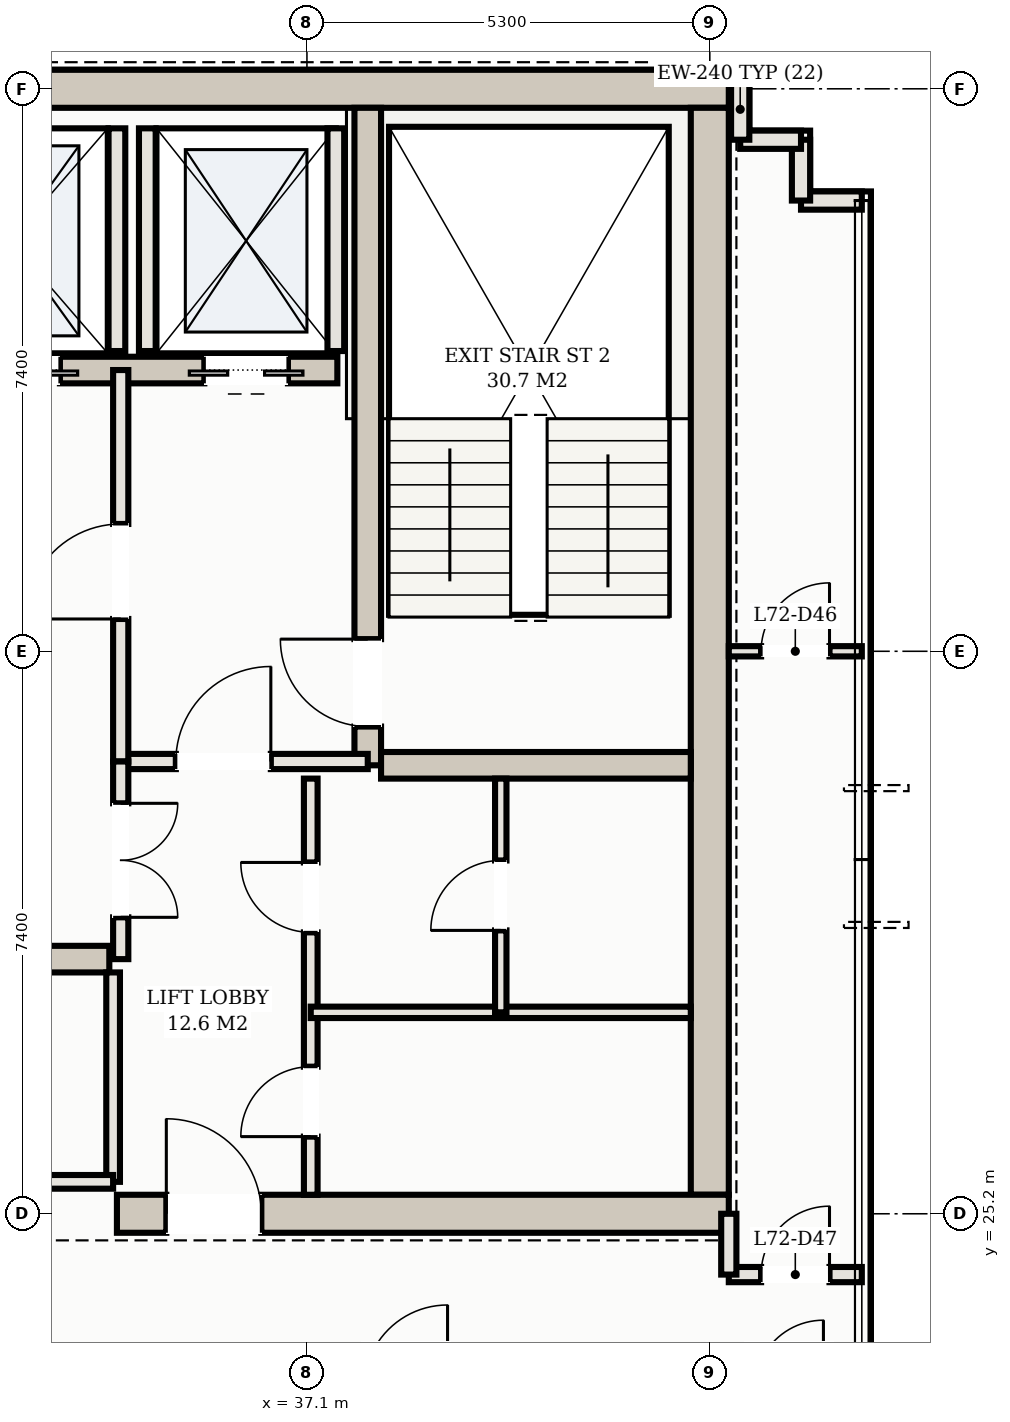
"""IFC4 building model, lengths in metres.
Left out: names, types, materials, properties, quantities, classifications, styles, units other than length and angle.
Written with IfcOpenShell. Run it as: python <this file> out.ifc"""

import sys

from ifc_helpers import new_model, si_unit, direction, frame, frame_2d, origin, place, context, subcontext, project, spatial, rectangle, extrude, element, fill, save


model = new_model("IFC4")
c1 = context("Model", 3, precision=1e-05, world=origin(), true_north=direction((0.0, 1.0)))
c2 = subcontext(c1, "Body", "Model", "MODEL_VIEW")
j1 = project(units=[si_unit("LENGTHUNIT", "METRE"), si_unit("PLANEANGLEUNIT", "RADIAN")], contexts=[c1])
p1 = place(None, origin())
s1 = spatial("IfcSite", under=j1, at=p1, CompositionType="ELEMENT")
p2 = place(p1, origin())
s2 = spatial("IfcBuilding", under=s1, at=p2, CompositionType="ELEMENT")
p3 = place(p2, frame((0.0, 0.0, 259.4)))
s3 = spatial("IfcBuildingStorey", under=s2, at=p3, CompositionType="ELEMENT", Elevation=259.4)
p4 = place(p3, frame((10.35, 40.0, 0.0), z_axis=(0.0, 0.0, 1.0), x_axis=(1.0, 0.0, 0.0)))
e1 = element("IfcWall", 1, at=p4, inside=s3, PredefinedType="SHEAR", context=c2, shape_type="SweptSolid", body=[
    extrude(rectangle(XDim=32.3, YDim=0.5, at=frame_2d((16.15, 0.0))), origin(), (0.0, 0.0, 1.0), 3.11),
])
p5 = place(p3, frame((42.4, 25.45, 0.0), z_axis=(0.0, 0.0, 1.0), x_axis=(0.0, 1.0, 0.0)))
e2 = element("IfcWall", 2, at=p5, inside=s3, PredefinedType="SHEAR", context=c2, shape_type="SweptSolid", body=[
    extrude(rectangle(XDim=14.3, YDim=0.5, at=frame_2d((7.15, 0.0))), origin(), (0.0, 0.0, 1.0), 3.11),
])
p6 = place(p3, frame((34.6, 25.2, 0.0), z_axis=(0.0, 0.0, 1.0), x_axis=(1.0, 0.0, 0.0)))
e3 = element("IfcWall", 3, at=p6, inside=s3, PredefinedType="SHEAR", context=c2, shape_type="SweptSolid", body=[
    extrude(rectangle(XDim=8.05, YDim=0.5, at=frame_2d((4.025, 0.0))), origin(), (0.0, 0.0, 1.0), 3.11),
])
p7 = place(p6, frame((0.65, 0.0, 0.0)))
e4 = element("IfcOpeningElement", 4, at=p7, cuts=e3, PredefinedType="OPENING", context=c2, shape_type="SweptSolid", body=[
    extrude(rectangle(XDim=1.25, YDim=2.2, at=frame_2d((0.625, 1.1))), frame((0.0, 0.26, 0.0), z_axis=(0.0, -1.0, 0.0), x_axis=(1.0, 0.0, 0.0)), (0.0, 0.0, 1.0), 0.52),
])
p8 = place(p3, frame((37.9, 31.1, 0.0), z_axis=(0.0, 0.0, 1.0), x_axis=(0.0, 1.0, 0.0)))
e5 = element("IfcWall", 5, at=p8, inside=s3, PredefinedType="SHEAR", context=c2, shape_type="SweptSolid", body=[
    extrude(rectangle(XDim=8.65, YDim=0.35, at=frame_2d((4.325, 0.0))), origin(), (0.0, 0.0, 1.0), 3.11),
])
p9 = place(p8, frame((0.51, 0.0, 0.0)))
e6 = element("IfcOpeningElement", 6, at=p9, cuts=e5, PredefinedType="OPENING", context=c2, shape_type="SweptSolid", body=[
    extrude(rectangle(XDim=1.15, YDim=2.2, at=frame_2d((0.575, 1.1))), frame((0.0, 0.185, 0.0), z_axis=(0.0, -1.0, 0.0), x_axis=(1.0, 0.0, 0.0)), (0.0, 0.0, 1.0), 0.37),
])
p10 = place(p3, frame((38.075, 31.1, 0.0), z_axis=(0.0, 0.0, 1.0), x_axis=(1.0, 0.0, 0.0)))
e7 = element("IfcWall", 7, at=p10, inside=s3, PredefinedType="SHEAR", context=c2, shape_type="SweptSolid", body=[
    extrude(rectangle(XDim=4.075, YDim=0.35, at=frame_2d((2.038, 0.0))), origin(), (0.0, 0.0, 1.0), 3.11),
])
p11 = place(p3, frame((15.5, 36.3, 0.0), z_axis=(0.0, 0.0, 1.0), x_axis=(1.0, 0.0, 0.0)))
e8 = element("IfcWall", 8, at=p11, inside=s3, PredefinedType="SHEAR", context=c2, shape_type="SweptSolid", body=[
    extrude(rectangle(XDim=22.0, YDim=0.35, at=frame_2d((11.0, 0.0))), origin(), (0.0, 0.0, 1.0), 3.11),
])
p12 = place(p11, frame((0.65, 0.0, 0.0)))
e9 = element("IfcOpeningElement", 9, at=p12, cuts=e8, PredefinedType="OPENING", context=c2, shape_type="SweptSolid", body=[
    extrude(rectangle(XDim=1.1, YDim=2.15, at=frame_2d((0.55, 1.075))), frame((0.0, 0.185, 0.0), z_axis=(0.0, -1.0, 0.0), x_axis=(1.0, 0.0, 0.0)), (0.0, 0.0, 1.0), 0.37),
])
p13 = place(p11, frame((20.25, 0.0, 0.0)))
e10 = element("IfcOpeningElement", 10, at=p13, cuts=e8, PredefinedType="OPENING", context=c2, shape_type="SweptSolid", body=[
    extrude(rectangle(XDim=1.1, YDim=2.15, at=frame_2d((0.55, 1.075))), frame((0.0, 0.185, 0.0), z_axis=(0.0, -1.0, 0.0), x_axis=(1.0, 0.0, 0.0)), (0.0, 0.0, 1.0), 0.37),
])
p14 = place(p11, frame((17.05, 0.0, 0.0)))
e11 = element("IfcOpeningElement", 11, at=p14, cuts=e8, PredefinedType="OPENING", context=c2, shape_type="SweptSolid", body=[
    extrude(rectangle(XDim=1.3, YDim=2.2, at=frame_2d((0.65, 1.1))), frame((0.0, 0.185, 0.0), z_axis=(0.0, -1.0, 0.0), x_axis=(1.0, 0.0, 0.0)), (0.0, 0.0, 1.0), 0.37),
])
p15 = place(p11, frame((3.95, 0.0, 0.0)))
e12 = element("IfcOpeningElement", 12, at=p15, cuts=e8, PredefinedType="OPENING", context=c2, shape_type="SweptSolid", body=[
    extrude(rectangle(XDim=1.1, YDim=2.15, at=frame_2d((0.55, 1.075))), frame((0.0, 0.185, 0.0), z_axis=(0.0, -1.0, 0.0), x_axis=(1.0, 0.0, 0.0)), (0.0, 0.0, 1.0), 0.37),
])
p16 = place(p11, frame((6.55, 0.0, 0.0)))
e13 = element("IfcOpeningElement", 13, at=p16, cuts=e8, PredefinedType="OPENING", context=c2, shape_type="SweptSolid", body=[
    extrude(rectangle(XDim=1.1, YDim=2.15, at=frame_2d((0.55, 1.075))), frame((0.0, 0.185, 0.0), z_axis=(0.0, -1.0, 0.0), x_axis=(1.0, 0.0, 0.0)), (0.0, 0.0, 1.0), 0.37),
])
p17 = place(p11, frame((9.15, 0.0, 0.0)))
e14 = element("IfcOpeningElement", 14, at=p17, cuts=e8, PredefinedType="OPENING", context=c2, shape_type="SweptSolid", body=[
    extrude(rectangle(XDim=1.1, YDim=2.15, at=frame_2d((0.55, 1.075))), frame((0.0, 0.185, 0.0), z_axis=(0.0, -1.0, 0.0), x_axis=(1.0, 0.0, 0.0)), (0.0, 0.0, 1.0), 0.37),
])
p18 = place(p3, frame((18.5, 28.55, 0.0), z_axis=(0.0, 0.0, 1.0), x_axis=(1.0, 0.0, 0.0)))
e15 = element("IfcWall", 15, at=p18, inside=s3, PredefinedType="SHEAR", context=c2, shape_type="SweptSolid", body=[
    extrude(rectangle(XDim=16.0, YDim=0.35, at=frame_2d((8.0, 0.0))), origin(), (0.0, 0.0, 1.0), 3.11),
])
for number, where, z_axis, x_axis in (
    (16, (35.0, 36.55, 0.0), (0.0, 0.0, 1.0), (0.0, 1.0, 0.0)),
    (17, (37.48, 36.55, 0.0), (0.0, 0.0, 1.0), (0.0, 1.0, 0.0)),
    (18, (34.6, 36.55, 0.0), (0.0, 0.0, 1.0), (0.0, 1.0, 0.0)),
):
    element("IfcWall", number, at=place(p3, frame(where, z_axis=z_axis, x_axis=x_axis)), inside=s3, PredefinedType="SOLIDWALL", context=c2, shape_type="SweptSolid", body=[
        extrude(rectangle(XDim=2.93, YDim=0.22, at=frame_2d((1.465, 0.0))), origin(), (0.0, 0.0, 1.0), 3.11),
    ])
p19 = place(p3, frame((44.4, 38.53, 0.0), z_axis=(0.0, 0.0, 1.0), x_axis=(-1.0, 0.0, 0.0)))
e19 = element("IfcWall", 19, at=p19, inside=s3, PredefinedType="SOLIDWALL", context=c2, shape_type="SweptSolid", body=[
    extrude(rectangle(XDim=0.8, YDim=0.24, at=frame_2d((0.4, 0.0))), origin(), (0.0, 0.0, 1.0), 3.11),
])
for number, where, z_axis, x_axis in (
    (20, (43.6, 38.53, 0.0), (0.0, 0.0, 1.0), (0.0, 1.0, 0.0)),
    (21, (43.6, 39.33, 0.0), (0.0, 0.0, 1.0), (-1.0, 0.0, 0.0)),
):
    element("IfcWall", number, at=place(p3, frame(where, z_axis=z_axis, x_axis=x_axis)), inside=s3, PredefinedType="SOLIDWALL", context=c2, shape_type="SweptSolid", body=[
        extrude(rectangle(XDim=0.8, YDim=0.24, at=frame_2d((0.4, 0.0))), origin(), (0.0, 0.0, 1.0), 3.11),
    ])
p20 = place(p3, frame((42.8, 39.33, 0.0), z_axis=(0.0, 0.0, 1.0), x_axis=(0.0, 1.0, 0.0)))
e22 = element("IfcWall", 22, at=p20, inside=s3, PredefinedType="SOLIDWALL", context=c2, shape_type="SweptSolid", body=[
    extrude(rectangle(XDim=0.8, YDim=0.24, at=frame_2d((0.4, 0.0))), origin(), (0.0, 0.0, 1.0), 3.11),
])
p21 = place(p3, frame((34.65, 31.15, 0.0), z_axis=(0.0, 0.0, 1.0), x_axis=(1.0, 0.0, 0.0)))
e23 = element("IfcWall", 23, at=p21, inside=s3, PredefinedType="PARTITIONING", context=c2, shape_type="SweptSolid", body=[
    extrude(rectangle(XDim=3.25, YDim=0.2, at=frame_2d((1.625, 0.0))), origin(), (0.0, 0.0, 1.0), 2.45),
])
p22 = place(p21, frame((0.725, 0.0, 0.0)))
e24 = element("IfcOpeningElement", 24, at=p22, cuts=e23, PredefinedType="OPENING", context=c2, shape_type="SweptSolid", body=[
    extrude(rectangle(XDim=1.25, YDim=2.2, at=frame_2d((0.625, 1.1))), frame((0.0, 0.11, 0.0), z_axis=(0.0, -1.0, 0.0), x_axis=(1.0, 0.0, 0.0)), (0.0, 0.0, 1.0), 0.22),
])
p23 = place(p3, frame((34.65, 31.15, 0.0), z_axis=(0.0, 0.0, 1.0), x_axis=(0.0, 1.0, 0.0)))
e25 = element("IfcWall", 25, at=p23, inside=s3, PredefinedType="PARTITIONING", context=c2, shape_type="SweptSolid", body=[
    extrude(rectangle(XDim=5.15, YDim=0.2, at=frame_2d((2.575, 0.0))), origin(), (0.0, 0.0, 1.0), 2.45),
])
p24 = place(p23, frame((1.875, 0.0, 0.0)))
e26 = element("IfcOpeningElement", 26, at=p24, cuts=e25, PredefinedType="OPENING", context=c2, shape_type="SweptSolid", body=[
    extrude(rectangle(XDim=1.25, YDim=2.2, at=frame_2d((0.625, 1.1))), frame((0.0, 0.11, 0.0), z_axis=(0.0, -1.0, 0.0), x_axis=(1.0, 0.0, 0.0)), (0.0, 0.0, 1.0), 0.22),
])
p25 = place(p3, frame((37.15, 25.45, 0.0), z_axis=(0.0, 0.0, 1.0), x_axis=(0.0, 1.0, 0.0)))
e27 = element("IfcWall", 27, at=p25, inside=s3, PredefinedType="PARTITIONING", context=c2, shape_type="SweptSolid", body=[
    extrude(rectangle(XDim=5.475, YDim=0.18, at=frame_2d((2.738, 0.0))), origin(), (0.0, 0.0, 1.0), 2.45),
])
p26 = place(p25, frame((0.765, 0.0, 0.0)))
e28 = element("IfcOpeningElement", 28, at=p26, cuts=e27, PredefinedType="OPENING", context=c2, shape_type="SweptSolid", body=[
    extrude(rectangle(XDim=0.92, YDim=2.15, at=frame_2d((0.46, 1.075))), frame((0.0, 0.1, 0.0), z_axis=(0.0, -1.0, 0.0), x_axis=(1.0, 0.0, 0.0)), (0.0, 0.0, 1.0), 0.2),
])
p27 = place(p25, frame((3.452, 0.0, 0.0)))
e29 = element("IfcOpeningElement", 29, at=p27, cuts=e27, PredefinedType="OPENING", context=c2, shape_type="SweptSolid", body=[
    extrude(rectangle(XDim=0.92, YDim=2.15, at=frame_2d((0.46, 1.075))), frame((0.0, 0.1, 0.0), z_axis=(0.0, -1.0, 0.0), x_axis=(1.0, 0.0, 0.0)), (0.0, 0.0, 1.0), 0.2),
])
p28 = place(p3, frame((37.15, 27.85, 0.0), z_axis=(0.0, 0.0, 1.0), x_axis=(1.0, 0.0, 0.0)))
e30 = element("IfcWall", 30, at=p28, inside=s3, PredefinedType="PARTITIONING", context=c2, shape_type="SweptSolid", body=[
    extrude(rectangle(XDim=5.0, YDim=0.15, at=frame_2d((2.5, 0.0))), origin(), (0.0, 0.0, 1.0), 2.45),
])
p29 = place(p3, frame((39.65, 27.85, 0.0), z_axis=(0.0, 0.0, 1.0), x_axis=(0.0, 1.0, 0.0)))
e31 = element("IfcWall", 31, at=p29, inside=s3, PredefinedType="PARTITIONING", context=c2, shape_type="SweptSolid", body=[
    extrude(rectangle(XDim=3.075, YDim=0.15, at=frame_2d((1.538, 0.0))), origin(), (0.0, 0.0, 1.0), 2.45),
])
p30 = place(p29, frame((1.078, 0.0, 0.0)))
e32 = element("IfcOpeningElement", 32, at=p30, cuts=e31, PredefinedType="OPENING", context=c2, shape_type="SweptSolid", body=[
    extrude(rectangle(XDim=0.92, YDim=2.15, at=frame_2d((0.46, 1.075))), frame((0.0, 0.085, 0.0), z_axis=(0.0, -1.0, 0.0), x_axis=(1.0, 0.0, 0.0)), (0.0, 0.0, 1.0), 0.17),
])
p31 = place(p3, frame((34.65, 28.55, 0.0), z_axis=(0.0, 0.0, 1.0), x_axis=(0.0, 1.0, 0.0)))
e33 = element("IfcWall", 33, at=p31, inside=s3, PredefinedType="PARTITIONING", context=c2, shape_type="SweptSolid", body=[
    extrude(rectangle(XDim=2.6, YDim=0.2, at=frame_2d((1.3, 0.0))), origin(), (0.0, 0.0, 1.0), 2.45),
])
p32 = place(p31, frame((0.55, 0.0, 0.0)))
e34 = element("IfcOpeningElement", 34, at=p32, cuts=e33, PredefinedType="OPENING", context=c2, shape_type="SweptSolid", body=[
    extrude(rectangle(XDim=1.5, YDim=2.25, at=frame_2d((0.75, 1.125))), frame((0.0, 0.11, 0.0), z_axis=(0.0, -1.0, 0.0), x_axis=(1.0, 0.0, 0.0)), (0.0, 0.0, 1.0), 0.22),
])
p33 = place(p3, frame((34.55, 25.62, 0.0), z_axis=(0.0, 0.0, 1.0), x_axis=(0.0, 1.0, 0.0)))
e35 = element("IfcWall", 35, at=p33, inside=s3, PredefinedType="PARTITIONING", context=c2, shape_type="SweptSolid", body=[
    extrude(rectangle(XDim=2.755, YDim=0.18, at=frame_2d((1.377, 0.0))), origin(), (0.0, 0.0, 1.0), 2.45),
])
p34 = place(p3, frame((26.65, 25.62, 0.0), z_axis=(0.0, 0.0, 1.0), x_axis=(1.0, 0.0, 0.0)))
e36 = element("IfcWall", 36, at=p34, inside=s3, PredefinedType="PARTITIONING", context=c2, shape_type="SweptSolid", body=[
    extrude(rectangle(XDim=7.9, YDim=0.18, at=frame_2d((3.95, 0.0))), origin(), (0.0, 0.0, 1.0), 2.45),
])
p35 = place(p34, frame((3.34, 0.0, 0.0)))
e37 = element("IfcOpeningElement", 37, at=p35, cuts=e36, PredefinedType="OPENING", context=c2, shape_type="SweptSolid", body=[
    extrude(rectangle(XDim=0.92, YDim=2.15, at=frame_2d((0.46, 1.075))), frame((0.0, 0.1, 0.0), z_axis=(0.0, -1.0, 0.0), x_axis=(1.0, 0.0, 0.0)), (0.0, 0.0, 1.0), 0.2),
])
p36 = place(p3, frame((42.65, 24.4, 0.0), z_axis=(0.0, 0.0, 1.0), x_axis=(1.0, 0.0, 0.0)))
e38 = element("IfcWall", 38, at=p36, inside=s3, PredefinedType="PARTITIONING", context=c2, shape_type="SweptSolid", body=[
    extrude(rectangle(XDim=1.75, YDim=0.2, at=frame_2d((0.875, 0.0))), origin(), (0.0, 0.0, 1.0), 2.45),
])
p37 = place(p36, frame((0.425, 0.0, 0.0)))
e39 = element("IfcOpeningElement", 39, at=p37, cuts=e38, PredefinedType="OPENING", context=c2, shape_type="SweptSolid", body=[
    extrude(rectangle(XDim=0.9, YDim=2.15, at=frame_2d((0.45, 1.075))), frame((0.0, 0.11, 0.0), z_axis=(0.0, -1.0, 0.0), x_axis=(1.0, 0.0, 0.0)), (0.0, 0.0, 1.0), 0.22),
])
p38 = place(p3, frame((42.65, 24.4, 0.0), z_axis=(0.0, 0.0, 1.0), x_axis=(0.0, 1.0, 0.0)))
e40 = element("IfcWall", 40, at=p38, inside=s3, PredefinedType="PARTITIONING", context=c2, shape_type="SweptSolid", body=[
    extrude(rectangle(XDim=0.8, YDim=0.2, at=frame_2d((0.4, 0.0))), origin(), (0.0, 0.0, 1.0), 2.45),
])
p39 = place(p3, frame((42.65, 32.6, 0.0), z_axis=(0.0, 0.0, 1.0), x_axis=(1.0, 0.0, 0.0)))
e41 = element("IfcWall", 41, at=p39, inside=s3, PredefinedType="PARTITIONING", context=c2, shape_type="SweptSolid", body=[
    extrude(rectangle(XDim=1.75, YDim=0.135, at=frame_2d((0.875, 0.0))), origin(), (0.0, 0.0, 1.0), 2.45),
])
p40 = place(p39, frame((0.425, 0.0, 0.0)))
e42 = element("IfcOpeningElement", 42, at=p40, cuts=e41, PredefinedType="OPENING", context=c2, shape_type="SweptSolid", body=[
    extrude(rectangle(XDim=0.9, YDim=2.15, at=frame_2d((0.45, 1.075))), frame((0.0, 0.078, 0.0), z_axis=(0.0, -1.0, 0.0), x_axis=(1.0, 0.0, 0.0)), (0.0, 0.0, 1.0), 0.155),
])
p41 = place(p13, frame((1.1, 0.0, 0.0), z_axis=(0.0, 0.0, 1.0), x_axis=(-1.0, 0.0, 0.0)))
e43 = element("IfcDoor", 43, at=p41, inside=s3, OperationType="DOUBLE_DOOR_SLIDING", PredefinedType="DOOR", context=c2, shape_type="SweptSolid", body=[
    extrude(rectangle(XDim=1.1, YDim=2.15, at=frame_2d((0.55, 1.075))), frame((0.0, 0.025, 0.0), z_axis=(0.0, -1.0, 0.0), x_axis=(1.0, 0.0, 0.0)), (0.0, 0.0, 1.0), 0.05),
])
fill(e10, e43)
p42 = place(p14, frame((1.3, 0.0, 0.0), z_axis=(0.0, 0.0, 1.0), x_axis=(-1.0, 0.0, 0.0)))
e44 = element("IfcDoor", 44, at=p42, inside=s3, OperationType="DOUBLE_DOOR_SLIDING", PredefinedType="DOOR", context=c2, shape_type="SweptSolid", body=[
    extrude(rectangle(XDim=1.3, YDim=2.2, at=frame_2d((0.65, 1.1))), frame((0.0, 0.025, 0.0), z_axis=(0.0, -1.0, 0.0), x_axis=(1.0, 0.0, 0.0)), (0.0, 0.0, 1.0), 0.05),
])
fill(e11, e44)
p43 = place(p7, origin())
e45 = element("IfcDoor", 45, at=p43, inside=s3, OperationType="SINGLE_SWING_LEFT", PredefinedType="DOOR", context=c2, shape_type="SweptSolid", body=[
    extrude(rectangle(XDim=1.25, YDim=2.2, at=frame_2d((0.625, 1.1))), frame((0.0, 0.025, 0.0), z_axis=(0.0, -1.0, 0.0), x_axis=(1.0, 0.0, 0.0)), (0.0, 0.0, 1.0), 0.05),
])
fill(e4, e45)
p44 = place(p22, origin())
e46 = element("IfcDoor", 46, at=p44, inside=s3, OperationType="SINGLE_SWING_RIGHT", PredefinedType="DOOR", context=c2, shape_type="SweptSolid", body=[
    extrude(rectangle(XDim=1.25, YDim=2.2, at=frame_2d((0.625, 1.1))), frame((0.0, 0.025, 0.0), z_axis=(0.0, -1.0, 0.0), x_axis=(1.0, 0.0, 0.0)), (0.0, 0.0, 1.0), 0.05),
])
fill(e24, e46)
p45 = place(p24, origin())
e47 = element("IfcDoor", 47, at=p45, inside=s3, OperationType="SINGLE_SWING_LEFT", PredefinedType="DOOR", context=c2, shape_type="SweptSolid", body=[
    extrude(rectangle(XDim=1.25, YDim=2.2, at=frame_2d((0.625, 1.1))), frame((0.0, 0.025, 0.0), z_axis=(0.0, -1.0, 0.0), x_axis=(1.0, 0.0, 0.0)), (0.0, 0.0, 1.0), 0.05),
])
fill(e26, e47)
p46 = place(p9, origin())
e48 = element("IfcDoor", 48, at=p46, inside=s3, OperationType="SINGLE_SWING_RIGHT", PredefinedType="DOOR", context=c2, shape_type="SweptSolid", body=[
    extrude(rectangle(XDim=1.15, YDim=2.2, at=frame_2d((0.575, 1.1))), frame((0.0, 0.025, 0.0), z_axis=(0.0, -1.0, 0.0), x_axis=(1.0, 0.0, 0.0)), (0.0, 0.0, 1.0), 0.05),
])
fill(e6, e48)
p47 = place(p26, origin())
e49 = element("IfcDoor", 49, at=p47, inside=s3, OperationType="SINGLE_SWING_LEFT", PredefinedType="DOOR", context=c2, shape_type="SweptSolid", body=[
    extrude(rectangle(XDim=0.92, YDim=2.15, at=frame_2d((0.46, 1.075))), frame((0.0, 0.025, 0.0), z_axis=(0.0, -1.0, 0.0), x_axis=(1.0, 0.0, 0.0)), (0.0, 0.0, 1.0), 0.05),
])
fill(e28, e49)
p48 = place(p27, origin())
e50 = element("IfcDoor", 50, at=p48, inside=s3, OperationType="SINGLE_SWING_RIGHT", PredefinedType="DOOR", context=c2, shape_type="SweptSolid", body=[
    extrude(rectangle(XDim=0.92, YDim=2.15, at=frame_2d((0.46, 1.075))), frame((0.0, 0.025, 0.0), z_axis=(0.0, -1.0, 0.0), x_axis=(1.0, 0.0, 0.0)), (0.0, 0.0, 1.0), 0.05),
])
fill(e29, e50)
p49 = place(p30, origin())
e51 = element("IfcDoor", 51, at=p49, inside=s3, OperationType="SINGLE_SWING_LEFT", PredefinedType="DOOR", context=c2, shape_type="SweptSolid", body=[
    extrude(rectangle(XDim=0.92, YDim=2.15, at=frame_2d((0.46, 1.075))), frame((0.0, 0.025, 0.0), z_axis=(0.0, -1.0, 0.0), x_axis=(1.0, 0.0, 0.0)), (0.0, 0.0, 1.0), 0.05),
])
fill(e32, e51)
p50 = place(p32, frame((1.5, 0.0, 0.0), z_axis=(0.0, 0.0, 1.0), x_axis=(-1.0, 0.0, 0.0)))
e52 = element("IfcDoor", 52, at=p50, inside=s3, OperationType="DOUBLE_DOOR_SINGLE_SWING", PredefinedType="DOOR", context=c2, shape_type="SweptSolid", body=[
    extrude(rectangle(XDim=1.5, YDim=2.25, at=frame_2d((0.75, 1.125))), frame((0.0, 0.025, 0.0), z_axis=(0.0, -1.0, 0.0), x_axis=(1.0, 0.0, 0.0)), (0.0, 0.0, 1.0), 0.05),
])
fill(e34, e52)
p51 = place(p40, origin())
e53 = element("IfcDoor", 53, at=p51, inside=s3, OperationType="SINGLE_SWING_RIGHT", PredefinedType="DOOR", context=c2, shape_type="SweptSolid", body=[
    extrude(rectangle(XDim=0.9, YDim=2.15, at=frame_2d((0.45, 1.075))), frame((0.0, 0.025, 0.0), z_axis=(0.0, -1.0, 0.0), x_axis=(1.0, 0.0, 0.0)), (0.0, 0.0, 1.0), 0.05),
])
fill(e42, e53)
p52 = place(p37, origin())
e54 = element("IfcDoor", 54, at=p52, inside=s3, OperationType="SINGLE_SWING_RIGHT", PredefinedType="DOOR", context=c2, shape_type="SweptSolid", body=[
    extrude(rectangle(XDim=0.9, YDim=2.15, at=frame_2d((0.45, 1.075))), frame((0.0, 0.025, 0.0), z_axis=(0.0, -1.0, 0.0), x_axis=(1.0, 0.0, 0.0)), (0.0, 0.0, 1.0), 0.05),
])
fill(e39, e54)
save(model, sys.argv[1])
